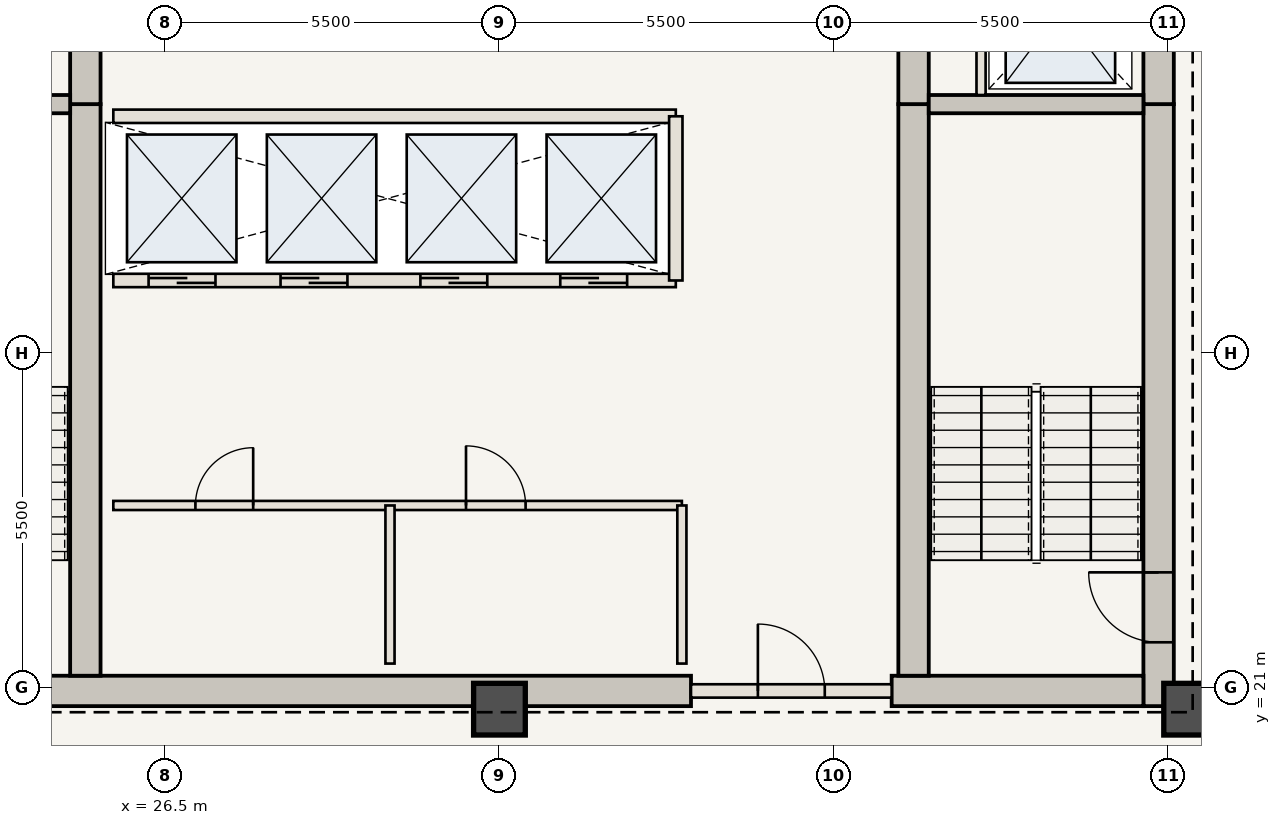
"""IFC4 building model, lengths in metres.
Left out: names, types, materials, properties, quantities, classifications, styles, units other than length and angle.
Written with IfcOpenShell. Run it as: python <this file> out.ifc"""

import sys

from ifc_helpers import new_model, si_unit, direction, frame, frame_2d, origin, origin_2d, place, context, subcontext, project, spatial, rectangle, extrude, element, fill, save


model = new_model("IFC4")
c1 = context("Model", 3, precision=1e-05, world=origin(), true_north=direction((0.0, 1.0)))
c2 = subcontext(c1, "Body", "Model", "MODEL_VIEW")
j1 = project(units=[si_unit("LENGTHUNIT", "METRE"), si_unit("PLANEANGLEUNIT", "RADIAN")], contexts=[c1])
p1 = place(None, origin())
s1 = spatial("IfcSite", under=j1, at=p1, CompositionType="ELEMENT")
p2 = place(p1, origin())
s2 = spatial("IfcBuilding", under=s1, at=p2, CompositionType="ELEMENT")
p3 = place(p2, frame((0.0, 0.0, 210.0)))
s3 = spatial("IfcBuildingStorey", under=s2, at=p3, CompositionType="ELEMENT", Elevation=210.0)
p4 = place(p3, frame((42.84, 20.7, 0.0), z_axis=(0.0, 0.0, 1.0), x_axis=(0.0, 1.0, 0.0)))
e1 = element("IfcWall", 1, at=p4, inside=s3, PredefinedType="SHEAR", context=c2, shape_type="SweptSolid", body=[
    extrude(rectangle(XDim=9.9, YDim=0.5, at=frame_2d((4.95, 0.0))), origin(), (0.0, 0.0, 1.0), 3.85),
])
p5 = place(p4, frame((1.05, 0.0, 0.0)))
e2 = element("IfcOpeningElement", 2, at=p5, cuts=e1, PredefinedType="OPENING", context=c2, shape_type="SweptSolid", body=[
    extrude(rectangle(XDim=1.15, YDim=2.15, at=frame_2d((0.575, 1.075))), frame((0.0, 0.26, 0.0), z_axis=(0.0, -1.0, 0.0), x_axis=(1.0, 0.0, 0.0)), (0.0, 0.0, 1.0), 0.52),
])
p6 = place(p3, frame((42.84, 30.6, 0.0), z_axis=(0.0, 0.0, 1.0), x_axis=(0.0, 1.0, 0.0)))
e3 = element("IfcWall", 3, at=p6, inside=s3, PredefinedType="SHEAR", context=c2, shape_type="SweptSolid", body=[
    extrude(rectangle(XDim=12.65, YDim=0.5, at=frame_2d((6.325, 0.0))), origin(), (0.0, 0.0, 1.0), 3.85),
])
p7 = place(p6, frame((4.2, 0.0, 0.0)))
e4 = element("IfcOpeningElement", 4, at=p7, cuts=e3, PredefinedType="OPENING", context=c2, shape_type="SweptSolid", body=[
    extrude(rectangle(XDim=1.1, YDim=2.15, at=frame_2d((0.55, 1.075))), frame((0.0, 0.26, 0.0), z_axis=(0.0, -1.0, 0.0), x_axis=(1.0, 0.0, 0.0)), (0.0, 0.0, 1.0), 0.52),
])
p8 = place(p6, frame((8.4, 0.0, 0.0)))
e5 = element("IfcOpeningElement", 5, at=p8, cuts=e3, PredefinedType="OPENING", context=c2, shape_type="SweptSolid", body=[
    extrude(rectangle(XDim=0.88, YDim=2.1, at=frame_2d((0.44, 1.05))), frame((0.0, 0.26, 0.0), z_axis=(0.0, -1.0, 0.0), x_axis=(1.0, 0.0, 0.0)), (0.0, 0.0, 1.0), 0.52),
])
p9 = place(p6, frame((10.5, 0.0, 0.0)))
e6 = element("IfcOpeningElement", 6, at=p9, cuts=e3, PredefinedType="OPENING", context=c2, shape_type="SweptSolid", body=[
    extrude(rectangle(XDim=0.88, YDim=2.1, at=frame_2d((0.44, 1.05))), frame((0.0, 0.26, 0.0), z_axis=(0.0, -1.0, 0.0), x_axis=(1.0, 0.0, 0.0)), (0.0, 0.0, 1.0), 0.52),
])
p10 = place(p3, frame((21.41, 20.95, 0.0), z_axis=(0.0, 0.0, 1.0), x_axis=(1.0, 0.0, 0.0)))
e7 = element("IfcWall", 7, at=p10, inside=s3, PredefinedType="SHEAR", context=c2, shape_type="SweptSolid", body=[
    extrude(rectangle(XDim=13.74, YDim=0.5, at=frame_2d((6.87, 0.0))), origin(), (0.0, 0.0, 1.0), 3.85),
])
p11 = place(p3, frame((38.45, 20.95, 0.0), z_axis=(0.0, 0.0, 1.0), x_axis=(1.0, 0.0, 0.0)))
e8 = element("IfcWall", 8, at=p11, inside=s3, PredefinedType="SHEAR", context=c2, shape_type="SweptSolid", body=[
    extrude(rectangle(XDim=4.14, YDim=0.5, at=frame_2d((2.07, 0.0))), origin(), (0.0, 0.0, 1.0), 3.85),
])
p12 = place(p3, frame((25.19, 21.2, 0.0), z_axis=(0.0, 0.0, 1.0), x_axis=(0.0, 1.0, 0.0)))
e9 = element("IfcWall", 9, at=p12, inside=s3, PredefinedType="SHEAR", context=c2, shape_type="SweptSolid", body=[
    extrude(rectangle(XDim=9.4, YDim=0.5, at=frame_2d((4.7, 0.0))), origin(), (0.0, 0.0, 1.0), 3.85),
])
p13 = place(p3, frame((25.19, 30.6, 0.0), z_axis=(0.0, 0.0, 1.0), x_axis=(0.0, 1.0, 0.0)))
e10 = element("IfcWall", 10, at=p13, inside=s3, PredefinedType="SHEAR", context=c2, shape_type="SweptSolid", body=[
    extrude(rectangle(XDim=12.15, YDim=0.5, at=frame_2d((6.075, 0.0))), origin(), (0.0, 0.0, 1.0), 3.85),
])
p14 = place(p13, frame((6.25, 0.0, 0.0)))
e11 = element("IfcOpeningElement", 11, at=p14, cuts=e10, PredefinedType="OPENING", context=c2, shape_type="SweptSolid", body=[
    extrude(rectangle(XDim=1.1, YDim=2.15, at=frame_2d((0.55, 1.075))), frame((0.0, 0.26, 0.0), z_axis=(0.0, -1.0, 0.0), x_axis=(1.0, 0.0, 0.0)), (0.0, 0.0, 1.0), 0.52),
])
p15 = place(p3, frame((38.81, 21.2, 0.0), z_axis=(0.0, 0.0, 1.0), x_axis=(0.0, 1.0, 0.0)))
e12 = element("IfcWall", 12, at=p15, inside=s3, PredefinedType="SHEAR", context=c2, shape_type="SweptSolid", body=[
    extrude(rectangle(XDim=9.4, YDim=0.5, at=frame_2d((4.7, 0.0))), origin(), (0.0, 0.0, 1.0), 3.85),
])
p16 = place(p3, frame((38.81, 30.6, 0.0), z_axis=(0.0, 0.0, 1.0), x_axis=(0.0, 1.0, 0.0)))
e13 = element("IfcWall", 13, at=p16, inside=s3, PredefinedType="SHEAR", context=c2, shape_type="SweptSolid", body=[
    extrude(rectangle(XDim=12.15, YDim=0.5, at=frame_2d((6.075, 0.0))), origin(), (0.0, 0.0, 1.0), 3.85),
])
for number, where, z_axis, x_axis in (
    (14, (32.0, 20.65, 0.0), (0.0, 0.0, 1.0), (1.0, 0.0, 0.0)),
    (15, (43.35, 20.65, 0.0), (0.0, 0.0, 1.0), (1.0, 0.0, 0.0)),
):
    element("IfcColumn", number, at=place(p3, frame(where, z_axis=z_axis, x_axis=x_axis)), inside=s3, PredefinedType="COLUMN", context=c2, shape_type="SweptSolid", body=[
        extrude(rectangle(XDim=0.85, YDim=0.85, at=origin_2d()), origin(), (0.0, 0.0, 1.0), 3.85),
    ])
for number, where, z_axis, x_axis in (
    (16, (21.41, 30.6, 0.0), (0.0, 0.0, 1.0), (1.0, 0.0, 0.0)),
    (17, (39.06, 30.6, 0.0), (0.0, 0.0, 1.0), (1.0, 0.0, 0.0)),
):
    element("IfcWall", number, at=place(p3, frame(where, z_axis=z_axis, x_axis=x_axis)), inside=s3, PredefinedType="SHEAR", context=c2, shape_type="SweptSolid", body=[
        extrude(rectangle(XDim=3.53, YDim=0.3, at=frame_2d((1.765, 0.0))), origin(), (0.0, 0.0, 1.0), 3.685),
    ])
p17 = place(p3, frame((39.92, 30.75, 0.0), z_axis=(0.0, 0.0, 1.0), x_axis=(0.0, 1.0, 0.0)))
e18 = element("IfcWall", 18, at=p17, inside=s3, PredefinedType="STANDARD", context=c2, shape_type="SweptSolid", body=[
    extrude(rectangle(XDim=2.65, YDim=0.15, at=frame_2d((1.325, 0.0))), origin(), (0.0, 0.0, 1.0), 3.685),
])
p18 = place(p3, frame((35.15, 20.95, 0.0), z_axis=(0.0, 0.0, 1.0), x_axis=(1.0, 0.0, 0.0)))
e19 = element("IfcWall", 19, at=p18, inside=s3, PredefinedType="STANDARD", context=c2, shape_type="SweptSolid", body=[
    extrude(rectangle(XDim=3.3, YDim=0.22, at=frame_2d((1.65, 0.0))), origin(), (0.0, 0.0, 1.0), 3.685),
])
p19 = place(p18, frame((1.1, 0.0, 0.0)))
e20 = element("IfcOpeningElement", 20, at=p19, cuts=e19, PredefinedType="OPENING", context=c2, shape_type="SweptSolid", body=[
    extrude(rectangle(XDim=1.1, YDim=2.15, at=frame_2d((0.55, 1.075))), frame((0.0, 0.12, 0.0), z_axis=(0.0, -1.0, 0.0), x_axis=(1.0, 0.0, 0.0)), (0.0, 0.0, 1.0), 0.24),
])
p20 = place(p3, frame((25.65, 24.0, 0.0), z_axis=(0.0, 0.0, 1.0), x_axis=(1.0, 0.0, 0.0)))
e21 = element("IfcWall", 21, at=p20, inside=s3, PredefinedType="STANDARD", context=c2, shape_type="SweptSolid", body=[
    extrude(rectangle(XDim=9.35, YDim=0.15, at=frame_2d((4.675, 0.0))), origin(), (0.0, 0.0, 1.0), 3.685),
])
p21 = place(p20, frame((1.35, 0.0, 0.0)))
e22 = element("IfcOpeningElement", 22, at=p21, cuts=e21, PredefinedType="OPENING", context=c2, shape_type="SweptSolid", body=[
    extrude(rectangle(XDim=0.95, YDim=2.15, at=frame_2d((0.475, 1.075))), frame((0.0, 0.085, 0.0), z_axis=(0.0, -1.0, 0.0), x_axis=(1.0, 0.0, 0.0)), (0.0, 0.0, 1.0), 0.17),
])
p22 = place(p20, frame((5.8, 0.0, 0.0)))
e23 = element("IfcOpeningElement", 23, at=p22, cuts=e21, PredefinedType="OPENING", context=c2, shape_type="SweptSolid", body=[
    extrude(rectangle(XDim=0.98, YDim=2.2, at=frame_2d((0.49, 1.1))), frame((0.0, 0.085, 0.0), z_axis=(0.0, -1.0, 0.0), x_axis=(1.0, 0.0, 0.0)), (0.0, 0.0, 1.0), 0.17),
])
for number, where, z_axis, x_axis in (
    (24, (30.2, 21.4, 0.0), (0.0, 0.0, 1.0), (0.0, 1.0, 0.0)),
    (25, (35.0, 21.4, 0.0), (0.0, 0.0, 1.0), (0.0, 1.0, 0.0)),
):
    element("IfcWall", number, at=place(p3, frame(where, z_axis=z_axis, x_axis=x_axis)), inside=s3, PredefinedType="STANDARD", context=c2, shape_type="SweptSolid", body=[
        extrude(rectangle(XDim=2.6, YDim=0.15, at=frame_2d((1.3, 0.0))), origin(), (0.0, 0.0, 1.0), 3.685),
    ])
p23 = place(p3, frame((25.65, 27.7, 0.0), z_axis=(0.0, 0.0, 1.0), x_axis=(1.0, 0.0, 0.0)))
e26 = element("IfcWall", 26, at=p23, inside=s3, PredefinedType="STANDARD", context=c2, shape_type="SweptSolid", body=[
    extrude(rectangle(XDim=9.25, YDim=0.22, at=frame_2d((4.625, 0.0))), origin(), (0.0, 0.0, 1.0), 3.685),
])
p24 = place(p23, frame((0.58, 0.0, 0.0)))
e27 = element("IfcOpeningElement", 27, at=p24, cuts=e26, PredefinedType="OPENING", context=c2, shape_type="SweptSolid", body=[
    extrude(rectangle(XDim=1.1, YDim=2.15, at=frame_2d((0.55, 1.075))), frame((0.0, 0.12, 0.0), z_axis=(0.0, -1.0, 0.0), x_axis=(1.0, 0.0, 0.0)), (0.0, 0.0, 1.0), 0.24),
])
p25 = place(p23, frame((2.75, 0.0, 0.0)))
e28 = element("IfcOpeningElement", 28, at=p25, cuts=e26, PredefinedType="OPENING", context=c2, shape_type="SweptSolid", body=[
    extrude(rectangle(XDim=1.1, YDim=2.15, at=frame_2d((0.55, 1.075))), frame((0.0, 0.12, 0.0), z_axis=(0.0, -1.0, 0.0), x_axis=(1.0, 0.0, 0.0)), (0.0, 0.0, 1.0), 0.24),
])
p26 = place(p23, frame((5.05, 0.0, 0.0)))
e29 = element("IfcOpeningElement", 29, at=p26, cuts=e26, PredefinedType="OPENING", context=c2, shape_type="SweptSolid", body=[
    extrude(rectangle(XDim=1.1, YDim=2.15, at=frame_2d((0.55, 1.075))), frame((0.0, 0.12, 0.0), z_axis=(0.0, -1.0, 0.0), x_axis=(1.0, 0.0, 0.0)), (0.0, 0.0, 1.0), 0.24),
])
p27 = place(p23, frame((7.35, 0.0, 0.0)))
e30 = element("IfcOpeningElement", 30, at=p27, cuts=e26, PredefinedType="OPENING", context=c2, shape_type="SweptSolid", body=[
    extrude(rectangle(XDim=1.1, YDim=2.15, at=frame_2d((0.55, 1.075))), frame((0.0, 0.12, 0.0), z_axis=(0.0, -1.0, 0.0), x_axis=(1.0, 0.0, 0.0)), (0.0, 0.0, 1.0), 0.24),
])
p28 = place(p3, frame((25.65, 30.4, 0.0), z_axis=(0.0, 0.0, 1.0), x_axis=(1.0, 0.0, 0.0)))
e31 = element("IfcWall", 31, at=p28, inside=s3, PredefinedType="STANDARD", context=c2, shape_type="SweptSolid", body=[
    extrude(rectangle(XDim=9.25, YDim=0.22, at=frame_2d((4.625, 0.0))), origin(), (0.0, 0.0, 1.0), 3.685),
])
p29 = place(p3, frame((34.9, 27.7, 0.0), z_axis=(0.0, 0.0, 1.0), x_axis=(0.0, 1.0, 0.0)))
e32 = element("IfcWall", 32, at=p29, inside=s3, PredefinedType="STANDARD", context=c2, shape_type="SweptSolid", body=[
    extrude(rectangle(XDim=2.7, YDim=0.22, at=frame_2d((1.35, 0.0))), origin(), (0.0, 0.0, 1.0), 3.685),
])
p30 = place(p5, origin())
e33 = element("IfcDoor", 33, at=p30, inside=s3, OperationType="SINGLE_SWING_RIGHT", PredefinedType="DOOR", context=c2, shape_type="SweptSolid", body=[
    extrude(rectangle(XDim=1.15, YDim=2.15, at=frame_2d((0.575, 1.075))), frame((0.0, 0.025, 0.0), z_axis=(0.0, -1.0, 0.0), x_axis=(1.0, 0.0, 0.0)), (0.0, 0.0, 1.0), 0.05),
])
fill(e2, e33)
p31 = place(p19, origin())
e34 = element("IfcDoor", 34, at=p31, inside=s3, OperationType="SINGLE_SWING_LEFT", PredefinedType="DOOR", context=c2, shape_type="SweptSolid", body=[
    extrude(rectangle(XDim=1.1, YDim=2.15, at=frame_2d((0.55, 1.075))), frame((0.0, 0.025, 0.0), z_axis=(0.0, -1.0, 0.0), x_axis=(1.0, 0.0, 0.0)), (0.0, 0.0, 1.0), 0.05),
])
fill(e20, e34)
p32 = place(p21, origin())
e35 = element("IfcDoor", 35, at=p32, inside=s3, OperationType="SINGLE_SWING_RIGHT", PredefinedType="DOOR", context=c2, shape_type="SweptSolid", body=[
    extrude(rectangle(XDim=0.95, YDim=2.15, at=frame_2d((0.475, 1.075))), frame((0.0, 0.025, 0.0), z_axis=(0.0, -1.0, 0.0), x_axis=(1.0, 0.0, 0.0)), (0.0, 0.0, 1.0), 0.05),
])
fill(e22, e35)
p33 = place(p22, origin())
e36 = element("IfcDoor", 36, at=p33, inside=s3, OperationType="SINGLE_SWING_LEFT", PredefinedType="DOOR", context=c2, shape_type="SweptSolid", body=[
    extrude(rectangle(XDim=0.98, YDim=2.2, at=frame_2d((0.49, 1.1))), frame((0.0, 0.025, 0.0), z_axis=(0.0, -1.0, 0.0), x_axis=(1.0, 0.0, 0.0)), (0.0, 0.0, 1.0), 0.05),
])
fill(e23, e36)
p34 = place(p24, origin())
e37 = element("IfcDoor", 37, at=p34, inside=s3, OperationType="DOUBLE_DOOR_SLIDING", PredefinedType="DOOR", context=c2, shape_type="SweptSolid", body=[
    extrude(rectangle(XDim=1.1, YDim=2.15, at=frame_2d((0.55, 1.075))), frame((0.0, 0.025, 0.0), z_axis=(0.0, -1.0, 0.0), x_axis=(1.0, 0.0, 0.0)), (0.0, 0.0, 1.0), 0.05),
])
fill(e27, e37)
p35 = place(p25, origin())
e38 = element("IfcDoor", 38, at=p35, inside=s3, OperationType="DOUBLE_DOOR_SLIDING", PredefinedType="DOOR", context=c2, shape_type="SweptSolid", body=[
    extrude(rectangle(XDim=1.1, YDim=2.15, at=frame_2d((0.55, 1.075))), frame((0.0, 0.025, 0.0), z_axis=(0.0, -1.0, 0.0), x_axis=(1.0, 0.0, 0.0)), (0.0, 0.0, 1.0), 0.05),
])
fill(e28, e38)
p36 = place(p26, origin())
e39 = element("IfcDoor", 39, at=p36, inside=s3, OperationType="DOUBLE_DOOR_SLIDING", PredefinedType="DOOR", context=c2, shape_type="SweptSolid", body=[
    extrude(rectangle(XDim=1.1, YDim=2.15, at=frame_2d((0.55, 1.075))), frame((0.0, 0.025, 0.0), z_axis=(0.0, -1.0, 0.0), x_axis=(1.0, 0.0, 0.0)), (0.0, 0.0, 1.0), 0.05),
])
fill(e29, e39)
p37 = place(p27, origin())
e40 = element("IfcDoor", 40, at=p37, inside=s3, OperationType="DOUBLE_DOOR_SLIDING", PredefinedType="DOOR", context=c2, shape_type="SweptSolid", body=[
    extrude(rectangle(XDim=1.1, YDim=2.15, at=frame_2d((0.55, 1.075))), frame((0.0, 0.025, 0.0), z_axis=(0.0, -1.0, 0.0), x_axis=(1.0, 0.0, 0.0)), (0.0, 0.0, 1.0), 0.05),
])
fill(e30, e40)
save(model, sys.argv[1])
